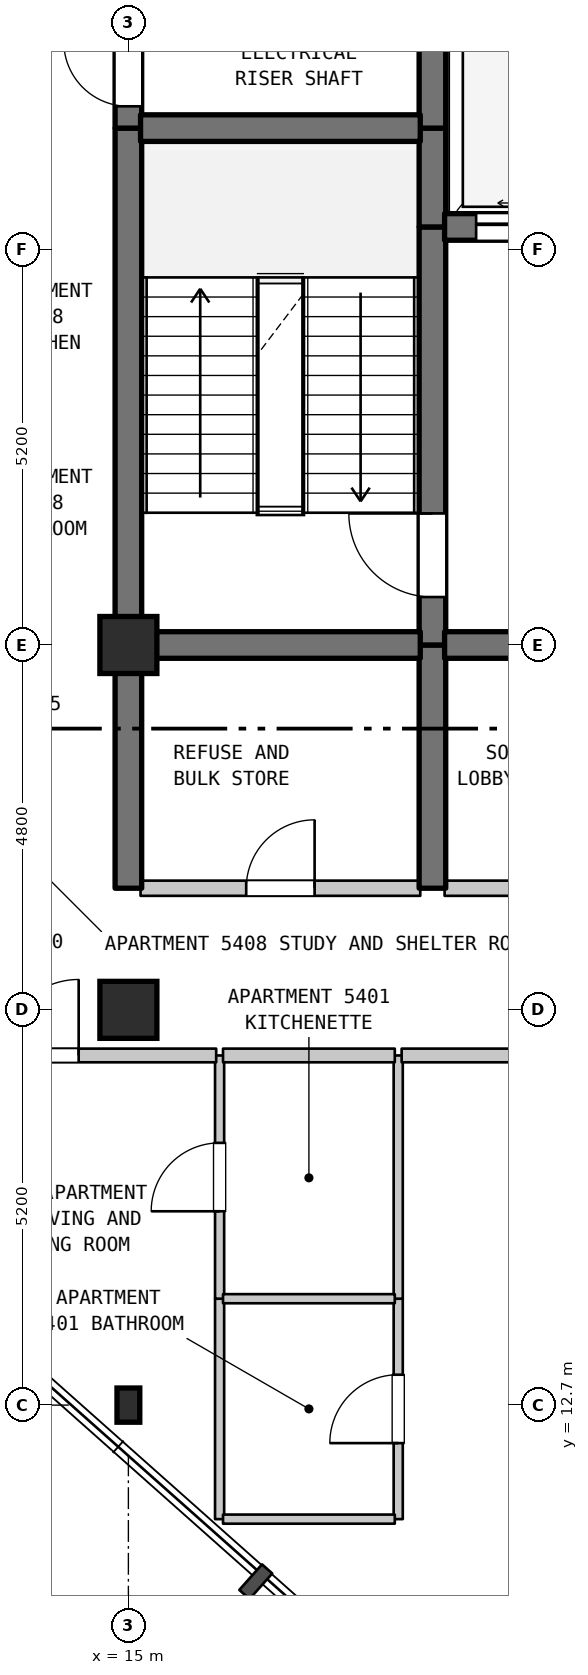
"""IFC4 building model, lengths in metres.
Left out: names, types, materials, properties, quantities, classifications, styles, units other than length and angle.
Written with IfcOpenShell. Run it as: python <this file> out.ifc"""

import sys

from ifc_helpers import new_model, si_unit, direction, frame, frame_2d, origin, origin_2d, place, context, subcontext, project, spatial, rectangle, i_section, extrude, element, fill, save


model = new_model("IFC4")
c1 = context("Model", 3, precision=1e-05, world=origin(), true_north=direction((0.0, 1.0)))
c2 = subcontext(c1, "Body", "Model", "MODEL_VIEW")
j1 = project(units=[si_unit("LENGTHUNIT", "METRE"), si_unit("PLANEANGLEUNIT", "RADIAN")], contexts=[c1])
p1 = place(None, origin())
s1 = spatial("IfcSite", under=j1, at=p1, CompositionType="ELEMENT")
p2 = place(p1, origin())
s2 = spatial("IfcBuilding", under=s1, at=p2, CompositionType="ELEMENT")
p3 = place(p2, frame((0.0, 0.0, 218.0)))
s3 = spatial("IfcBuildingStorey", under=s2, at=p3, CompositionType="ELEMENT", Elevation=218.0)
p4 = place(p3, frame((15.0, 12.7, 0.0), z_axis=(0.0, 0.0, 1.0), x_axis=(1.0, 0.0, 0.0)))
e1 = element("IfcColumn", 1, at=p4, inside=s3, PredefinedType="COLUMN", context=c2, shape_type="SweptSolid", body=[
    extrude(i_section(OverallWidth=0.3, OverallDepth=0.45, WebThickness=0.014, FlangeThickness=0.026, FilletRadius=0.027, at=origin_2d()), origin(), (0.0, 0.0, 1.0), 4.8),
])
for number, where, z_axis, x_axis in (
    (2, (15.0, 17.9, 0.0), (0.0, 0.0, 1.0), (1.0, 0.0, 0.0)),
    (3, (15.0, 22.7, 0.0), (0.0, 0.0, 1.0), (1.0, 0.0, 0.0)),
):
    element("IfcColumn", number, at=place(p3, frame(where, z_axis=z_axis, x_axis=x_axis)), inside=s3, PredefinedType="COLUMN", context=c2, shape_type="SweptSolid", body=[
        extrude(rectangle(XDim=0.75, YDim=0.75, at=origin_2d()), origin(), (0.0, 0.0, 1.0), 4.8),
    ])
p5 = place(p3, frame((15.0, 19.5, 0.0), z_axis=(0.0, 0.0, 1.0), x_axis=(0.0, 1.0, 0.0)))
e4 = element("IfcWall", 4, at=p5, inside=s3, PredefinedType="SHEAR", context=c2, shape_type="SweptSolid", body=[
    extrude(rectangle(XDim=3.2, YDim=0.35, at=frame_2d((1.6, 0.0))), origin(), (0.0, 0.0, 1.0), 4.49),
])
p6 = place(p3, frame((15.0, 22.7, 0.0), z_axis=(0.0, 0.0, 1.0), x_axis=(0.0, 1.0, 0.0)))
e5 = element("IfcWall", 5, at=p6, inside=s3, PredefinedType="SHEAR", context=c2, shape_type="SweptSolid", body=[
    extrude(rectangle(XDim=6.8, YDim=0.35, at=frame_2d((3.4, 0.0))), origin(), (0.0, 0.0, 1.0), 4.49),
])
p7 = place(p3, frame((15.0, 29.5, 0.0), z_axis=(0.0, 0.0, 1.0), x_axis=(0.0, 1.0, 0.0)))
e6 = element("IfcWall", 6, at=p7, inside=s3, PredefinedType="SHEAR", context=c2, shape_type="SweptSolid", body=[
    extrude(rectangle(XDim=1.6, YDim=0.35, at=frame_2d((0.8, 0.0))), origin(), (0.0, 0.0, 1.0), 4.49),
])
p8 = place(p7, frame((0.287, 0.0, 0.0)))
e7 = element("IfcOpeningElement", 7, at=p8, cuts=e6, PredefinedType="OPENING", context=c2, shape_type="SweptSolid", body=[
    extrude(rectangle(XDim=0.85, YDim=2.1, at=frame_2d((0.425, 1.05))), frame((0.0, 0.185, 0.0), z_axis=(0.0, -1.0, 0.0), x_axis=(1.0, 0.0, 0.0)), (0.0, 0.0, 1.0), 0.37),
])
p9 = place(p3, frame((16.2, 11.2, 0.0), z_axis=(0.0, 0.0, 1.0), x_axis=(0.0, 1.0, 0.0)))
e8 = element("IfcWall", 8, at=p9, inside=s3, PredefinedType="PARTITIONING", context=c2, shape_type="SweptSolid", body=[
    extrude(rectangle(XDim=2.9, YDim=0.12, at=frame_2d((1.45, 0.0))), origin(), (0.0, 0.0, 1.0), 4.49),
])
p10 = place(p3, frame((16.2, 14.1, 0.0), z_axis=(0.0, 0.0, 1.0), x_axis=(0.0, 1.0, 0.0)))
e9 = element("IfcWall", 9, at=p10, inside=s3, PredefinedType="PARTITIONING", context=c2, shape_type="SweptSolid", body=[
    extrude(rectangle(XDim=3.2, YDim=0.12, at=frame_2d((1.6, 0.0))), origin(), (0.0, 0.0, 1.0), 4.49),
])
p11 = place(p10, frame((1.15, 0.0, 0.0)))
e10 = element("IfcOpeningElement", 10, at=p11, cuts=e9, PredefinedType="OPENING", context=c2, shape_type="SweptSolid", body=[
    extrude(rectangle(XDim=0.9, YDim=2.15, at=frame_2d((0.45, 1.075))), frame((0.0, 0.07, 0.0), z_axis=(0.0, -1.0, 0.0), x_axis=(1.0, 0.0, 0.0)), (0.0, 0.0, 1.0), 0.14),
])
p12 = place(p3, frame((18.55, 11.2, 0.0), z_axis=(0.0, 0.0, 1.0), x_axis=(0.0, 1.0, 0.0)))
e11 = element("IfcWall", 11, at=p12, inside=s3, PredefinedType="PARTITIONING", context=c2, shape_type="SweptSolid", body=[
    extrude(rectangle(XDim=2.9, YDim=0.12, at=frame_2d((1.45, 0.0))), origin(), (0.0, 0.0, 1.0), 4.49),
])
p13 = place(p12, frame((1.0, 0.0, 0.0)))
e12 = element("IfcOpeningElement", 12, at=p13, cuts=e11, PredefinedType="OPENING", context=c2, shape_type="SweptSolid", body=[
    extrude(rectangle(XDim=0.9, YDim=2.1, at=frame_2d((0.45, 1.05))), frame((0.0, 0.07, 0.0), z_axis=(0.0, -1.0, 0.0), x_axis=(1.0, 0.0, 0.0)), (0.0, 0.0, 1.0), 0.14),
])
p14 = place(p3, frame((18.55, 14.1, 0.0), z_axis=(0.0, 0.0, 1.0), x_axis=(0.0, 1.0, 0.0)))
e13 = element("IfcWall", 13, at=p14, inside=s3, PredefinedType="PARTITIONING", context=c2, shape_type="SweptSolid", body=[
    extrude(rectangle(XDim=3.2, YDim=0.12, at=frame_2d((1.6, 0.0))), origin(), (0.0, 0.0, 1.0), 4.49),
])
p15 = place(p3, frame((19.0, 19.5, 0.0), z_axis=(0.0, 0.0, 1.0), x_axis=(0.0, 1.0, 0.0)))
e14 = element("IfcWall", 14, at=p15, inside=s3, PredefinedType="SHEAR", context=c2, shape_type="SweptSolid", body=[
    extrude(rectangle(XDim=3.2, YDim=0.35, at=frame_2d((1.6, 0.0))), origin(), (0.0, 0.0, 1.0), 4.49),
])
p16 = place(p3, frame((19.0, 22.7, 0.0), z_axis=(0.0, 0.0, 1.0), x_axis=(0.0, 1.0, 0.0)))
e15 = element("IfcWall", 15, at=p16, inside=s3, PredefinedType="SHEAR", context=c2, shape_type="SweptSolid", body=[
    extrude(rectangle(XDim=5.5, YDim=0.35, at=frame_2d((2.75, 0.0))), origin(), (0.0, 0.0, 1.0), 4.49),
])
p17 = place(p16, frame((0.631, 0.0, 0.0)))
e16 = element("IfcOpeningElement", 16, at=p17, cuts=e15, PredefinedType="OPENING", context=c2, shape_type="SweptSolid", body=[
    extrude(rectangle(XDim=1.1, YDim=2.15, at=frame_2d((0.55, 1.075))), frame((0.0, 0.185, 0.0), z_axis=(0.0, -1.0, 0.0), x_axis=(1.0, 0.0, 0.0)), (0.0, 0.0, 1.0), 0.37),
])
p18 = place(p3, frame((19.0, 28.2, 0.0), z_axis=(0.0, 0.0, 1.0), x_axis=(0.0, 1.0, 0.0)))
e17 = element("IfcWall", 17, at=p18, inside=s3, PredefinedType="SHEAR", context=c2, shape_type="SweptSolid", body=[
    extrude(rectangle(XDim=1.3, YDim=0.35, at=frame_2d((0.65, 0.0))), origin(), (0.0, 0.0, 1.0), 4.49),
])
p19 = place(p3, frame((19.0, 29.5, 0.0), z_axis=(0.0, 0.0, 1.0), x_axis=(0.0, 1.0, 0.0)))
e18 = element("IfcWall", 18, at=p19, inside=s3, PredefinedType="SHEAR", context=c2, shape_type="SweptSolid", body=[
    extrude(rectangle(XDim=5.5, YDim=0.35, at=frame_2d((2.75, 0.0))), origin(), (0.0, 0.0, 1.0), 4.49),
])
p20 = place(p19, frame((2.025, 0.0, 0.0)))
e19 = element("IfcOpeningElement", 19, at=p20, cuts=e18, PredefinedType="OPENING", context=c2, shape_type="SweptSolid", body=[
    extrude(rectangle(XDim=1.1, YDim=2.15, at=frame_2d((0.55, 1.075))), frame((0.0, 0.185, 0.0), z_axis=(0.0, -1.0, 0.0), x_axis=(1.0, 0.0, 0.0)), (0.0, 0.0, 1.0), 0.37),
])
for number, where, z_axis, x_axis in (
    (20, (16.245, 11.2, 0.0), (0.0, 0.0, 1.0), (1.0, 0.0, 0.0)),
    (21, (16.245, 14.1, 0.0), (0.0, 0.0, 1.0), (1.0, 0.0, 0.0)),
):
    element("IfcWall", number, at=place(p3, frame(where, z_axis=z_axis, x_axis=x_axis)), inside=s3, PredefinedType="PARTITIONING", context=c2, shape_type="SweptSolid", body=[
        extrude(rectangle(XDim=2.26, YDim=0.12, at=frame_2d((1.13, 0.0))), origin(), (0.0, 0.0, 1.0), 4.49),
    ])
p21 = place(p3, frame((12.875, 17.3, 0.0), z_axis=(0.0, 0.0, 1.0), x_axis=(1.0, 0.0, 0.0)))
e22 = element("IfcWall", 22, at=p21, inside=s3, PredefinedType="STANDARD", context=c2, shape_type="SweptSolid", body=[
    extrude(rectangle(XDim=3.28, YDim=0.18, at=frame_2d((1.64, 0.0))), origin(), (0.0, 0.0, 1.0), 4.49),
])
p22 = place(p21, frame((0.471, 0.0, 0.0)))
e23 = element("IfcOpeningElement", 23, at=p22, cuts=e22, PredefinedType="OPENING", context=c2, shape_type="SweptSolid", body=[
    extrude(rectangle(XDim=1.0, YDim=2.15, at=frame_2d((0.5, 1.075))), frame((0.0, 0.1, 0.0), z_axis=(0.0, -1.0, 0.0), x_axis=(1.0, 0.0, 0.0)), (0.0, 0.0, 1.0), 0.2),
])
p23 = place(p3, frame((16.245, 17.3, 0.0), z_axis=(0.0, 0.0, 1.0), x_axis=(1.0, 0.0, 0.0)))
e24 = element("IfcWall", 24, at=p23, inside=s3, PredefinedType="STANDARD", context=c2, shape_type="SweptSolid", body=[
    extrude(rectangle(XDim=2.26, YDim=0.18, at=frame_2d((1.13, 0.0))), origin(), (0.0, 0.0, 1.0), 4.49),
])
p24 = place(p3, frame((18.595, 17.3, 0.0), z_axis=(0.0, 0.0, 1.0), x_axis=(1.0, 0.0, 0.0)))
e25 = element("IfcWall", 25, at=p24, inside=s3, PredefinedType="STANDARD", context=c2, shape_type="SweptSolid", body=[
    extrude(rectangle(XDim=1.86, YDim=0.18, at=frame_2d((0.93, 0.0))), origin(), (0.0, 0.0, 1.0), 4.49),
])
p25 = place(p3, frame((15.16, 19.5, 0.0), z_axis=(0.0, 0.0, 1.0), x_axis=(1.0, 0.0, 0.0)))
e26 = element("IfcWall", 26, at=p25, inside=s3, PredefinedType="STANDARD", context=c2, shape_type="SweptSolid", body=[
    extrude(rectangle(XDim=3.68, YDim=0.2, at=frame_2d((1.84, 0.0))), origin(), (0.0, 0.0, 1.0), 4.49),
])
p26 = place(p25, frame((1.39, 0.0, 0.0)))
e27 = element("IfcOpeningElement", 27, at=p26, cuts=e26, PredefinedType="OPENING", context=c2, shape_type="SweptSolid", body=[
    extrude(rectangle(XDim=0.9, YDim=2.15, at=frame_2d((0.45, 1.075))), frame((0.0, 0.11, 0.0), z_axis=(0.0, -1.0, 0.0), x_axis=(1.0, 0.0, 0.0)), (0.0, 0.0, 1.0), 0.22),
])
p27 = place(p3, frame((19.16, 19.5, 0.0), z_axis=(0.0, 0.0, 1.0), x_axis=(1.0, 0.0, 0.0)))
e28 = element("IfcWall", 28, at=p27, inside=s3, PredefinedType="STANDARD", context=c2, shape_type="SweptSolid", body=[
    extrude(rectangle(XDim=4.48, YDim=0.2, at=frame_2d((2.24, 0.0))), origin(), (0.0, 0.0, 1.0), 4.49),
])
p28 = place(p27, frame((1.64, 0.0, 0.0)))
e29 = element("IfcOpeningElement", 29, at=p28, cuts=e28, PredefinedType="OPENING", context=c2, shape_type="SweptSolid", body=[
    extrude(rectangle(XDim=1.2, YDim=2.2, at=frame_2d((0.6, 1.1))), frame((0.0, 0.11, 0.0), z_axis=(0.0, -1.0, 0.0), x_axis=(1.0, 0.0, 0.0)), (0.0, 0.0, 1.0), 0.22),
])
p29 = place(p3, frame((15.16, 22.7, 0.0), z_axis=(0.0, 0.0, 1.0), x_axis=(1.0, 0.0, 0.0)))
e30 = element("IfcWall", 30, at=p29, inside=s3, PredefinedType="SHEAR", context=c2, shape_type="SweptSolid", body=[
    extrude(rectangle(XDim=3.68, YDim=0.35, at=frame_2d((1.84, 0.0))), origin(), (0.0, 0.0, 1.0), 4.49),
])
p30 = place(p3, frame((19.16, 22.7, 0.0), z_axis=(0.0, 0.0, 1.0), x_axis=(1.0, 0.0, 0.0)))
e31 = element("IfcWall", 31, at=p30, inside=s3, PredefinedType="SHEAR", context=c2, shape_type="SweptSolid", body=[
    extrude(rectangle(XDim=4.48, YDim=0.35, at=frame_2d((2.24, 0.0))), origin(), (0.0, 0.0, 1.0), 4.49),
])
p31 = place(p30, frame((1.64, 0.0, 0.0)))
e32 = element("IfcOpeningElement", 32, at=p31, cuts=e31, PredefinedType="OPENING", context=c2, shape_type="SweptSolid", body=[
    extrude(rectangle(XDim=1.2, YDim=2.2, at=frame_2d((0.6, 1.1))), frame((0.0, 0.185, 0.0), z_axis=(0.0, -1.0, 0.0), x_axis=(1.0, 0.0, 0.0)), (0.0, 0.0, 1.0), 0.37),
])
p32 = place(p3, frame((19.16, 28.2, 0.0), z_axis=(0.0, 0.0, 1.0), x_axis=(1.0, 0.0, 0.0)))
e33 = element("IfcWall", 33, at=p32, inside=s3, PredefinedType="SHEAR", context=c2, shape_type="SweptSolid", body=[
    extrude(rectangle(XDim=4.48, YDim=0.35, at=frame_2d((2.24, 0.0))), origin(), (0.0, 0.0, 1.0), 4.49),
])
p33 = place(p32, frame((0.415, 0.0, 0.0)))
e34 = element("IfcOpeningElement", 34, at=p33, cuts=e33, PredefinedType="OPENING", context=c2, shape_type="SweptSolid", body=[
    extrude(rectangle(XDim=1.25, YDim=2.2, at=frame_2d((0.625, 1.1))), frame((0.0, 0.185, 0.0), z_axis=(0.0, -1.0, 0.0), x_axis=(1.0, 0.0, 0.0)), (0.0, 0.0, 1.0), 0.37),
])
p34 = place(p32, frame((2.815, 0.0, 0.0)))
e35 = element("IfcOpeningElement", 35, at=p34, cuts=e33, PredefinedType="OPENING", context=c2, shape_type="SweptSolid", body=[
    extrude(rectangle(XDim=1.25, YDim=2.2, at=frame_2d((0.625, 1.1))), frame((0.0, 0.185, 0.0), z_axis=(0.0, -1.0, 0.0), x_axis=(1.0, 0.0, 0.0)), (0.0, 0.0, 1.0), 0.37),
])
p35 = place(p3, frame((15.16, 29.5, 0.0), z_axis=(0.0, 0.0, 1.0), x_axis=(1.0, 0.0, 0.0)))
e36 = element("IfcWall", 36, at=p35, inside=s3, PredefinedType="SHEAR", context=c2, shape_type="SweptSolid", body=[
    extrude(rectangle(XDim=3.68, YDim=0.35, at=frame_2d((1.84, 0.0))), origin(), (0.0, 0.0, 1.0), 4.49),
])
p36 = place(p8, origin())
e37 = element("IfcDoor", 37, at=p36, inside=s3, OperationType="SINGLE_SWING_RIGHT", PredefinedType="DOOR", context=c2, shape_type="SweptSolid", body=[
    extrude(rectangle(XDim=0.85, YDim=2.1, at=frame_2d((0.425, 1.05))), frame((0.0, 0.025, 0.0), z_axis=(0.0, -1.0, 0.0), x_axis=(1.0, 0.0, 0.0)), (0.0, 0.0, 1.0), 0.05),
])
fill(e7, e37)
p37 = place(p11, origin())
e38 = element("IfcDoor", 38, at=p37, inside=s3, OperationType="SINGLE_SWING_LEFT", PredefinedType="DOOR", context=c2, shape_type="SweptSolid", body=[
    extrude(rectangle(XDim=0.9, YDim=2.15, at=frame_2d((0.45, 1.075))), frame((0.0, 0.025, 0.0), z_axis=(0.0, -1.0, 0.0), x_axis=(1.0, 0.0, 0.0)), (0.0, 0.0, 1.0), 0.05),
])
fill(e10, e38)
p38 = place(p13, origin())
e39 = element("IfcDoor", 39, at=p38, inside=s3, OperationType="SINGLE_SWING_LEFT", PredefinedType="DOOR", context=c2, shape_type="SweptSolid", body=[
    extrude(rectangle(XDim=0.9, YDim=2.1, at=frame_2d((0.45, 1.05))), frame((0.0, 0.025, 0.0), z_axis=(0.0, -1.0, 0.0), x_axis=(1.0, 0.0, 0.0)), (0.0, 0.0, 1.0), 0.05),
])
fill(e12, e39)
p39 = place(p17, origin())
e40 = element("IfcDoor", 40, at=p39, inside=s3, OperationType="SINGLE_SWING_RIGHT", PredefinedType="DOOR", context=c2, shape_type="SweptSolid", body=[
    extrude(rectangle(XDim=1.1, YDim=2.15, at=frame_2d((0.55, 1.075))), frame((0.0, 0.025, 0.0), z_axis=(0.0, -1.0, 0.0), x_axis=(1.0, 0.0, 0.0)), (0.0, 0.0, 1.0), 0.05),
])
fill(e16, e40)
p40 = place(p22, origin())
e41 = element("IfcDoor", 41, at=p40, inside=s3, OperationType="SINGLE_SWING_RIGHT", PredefinedType="DOOR", context=c2, shape_type="SweptSolid", body=[
    extrude(rectangle(XDim=1.0, YDim=2.15, at=frame_2d((0.5, 1.075))), frame((0.0, 0.025, 0.0), z_axis=(0.0, -1.0, 0.0), x_axis=(1.0, 0.0, 0.0)), (0.0, 0.0, 1.0), 0.05),
])
fill(e23, e41)
p41 = place(p26, origin())
e42 = element("IfcDoor", 42, at=p41, inside=s3, OperationType="SINGLE_SWING_RIGHT", PredefinedType="DOOR", context=c2, shape_type="SweptSolid", body=[
    extrude(rectangle(XDim=0.9, YDim=2.15, at=frame_2d((0.45, 1.075))), frame((0.0, 0.025, 0.0), z_axis=(0.0, -1.0, 0.0), x_axis=(1.0, 0.0, 0.0)), (0.0, 0.0, 1.0), 0.05),
])
fill(e27, e42)
p42 = place(p33, origin())
e43 = element("IfcDoor", 43, at=p42, inside=s3, OperationType="DOUBLE_DOOR_SLIDING", PredefinedType="DOOR", context=c2, shape_type="SweptSolid", body=[
    extrude(rectangle(XDim=1.25, YDim=2.2, at=frame_2d((0.625, 1.1))), frame((0.0, 0.025, 0.0), z_axis=(0.0, -1.0, 0.0), x_axis=(1.0, 0.0, 0.0)), (0.0, 0.0, 1.0), 0.05),
])
fill(e34, e43)
save(model, sys.argv[1])
